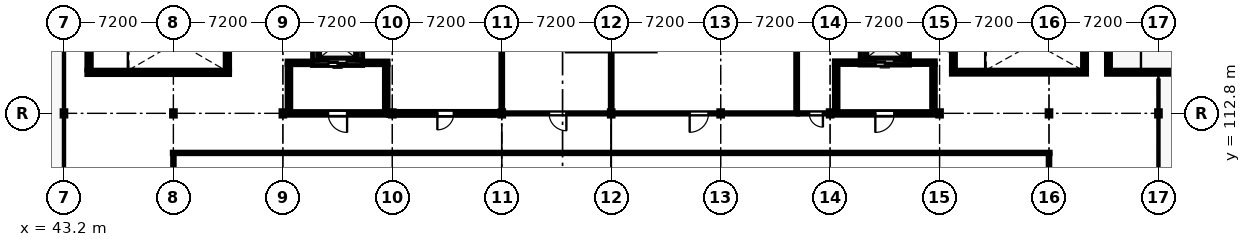
"""IFC4 building model, lengths in metres.
Left out: names, types, materials, properties, quantities, classifications, styles, units other than length and angle.
Written with IfcOpenShell. Run it as: python <this file> out.ifc"""

import sys

from ifc_helpers import new_model, si_unit, direction, frame, frame_2d, origin, origin_2d, place, context, subcontext, project, spatial, rectangle, i_section, extrude, element, fill, save


model = new_model("IFC4")
c1 = context("Model", 3, precision=1e-05, world=origin(), true_north=direction((0.0, 1.0)))
c2 = subcontext(c1, "Body", "Model", "MODEL_VIEW")
j1 = project(units=[si_unit("LENGTHUNIT", "METRE"), si_unit("PLANEANGLEUNIT", "RADIAN")], contexts=[c1])
p1 = place(None, origin())
s1 = spatial("IfcSite", under=j1, at=p1, CompositionType="ELEMENT")
p2 = place(p1, origin())
s2 = spatial("IfcBuilding", under=s1, at=p2, CompositionType="ELEMENT")
p3 = place(p2, frame((0.0, 0.0, 21.0)))
s3 = spatial("IfcBuildingStorey", under=s2, at=p3, CompositionType="ELEMENT", Elevation=21.0)
for number, where, z_axis, x_axis in (
    (1, (43.2, 112.8, 0.0), (0.0, 0.0, 1.0), (1.0, 0.0, 0.0)),
    (2, (50.4, 112.8, 0.0), (0.0, 0.0, 1.0), (1.0, 0.0, 0.0)),
    (3, (57.6, 112.8, 0.0), (0.0, 0.0, 1.0), (1.0, 0.0, 0.0)),
    (4, (64.8, 112.8, 0.0), (0.0, 0.0, 1.0), (1.0, 0.0, 0.0)),
    (5, (72.0, 112.8, 0.0), (0.0, 0.0, 1.0), (1.0, 0.0, 0.0)),
    (6, (79.2, 112.8, 0.0), (0.0, 0.0, 1.0), (1.0, 0.0, 0.0)),
    (7, (86.4, 112.8, 0.0), (0.0, 0.0, 1.0), (1.0, 0.0, 0.0)),
    (8, (93.6, 112.8, 0.0), (0.0, 0.0, 1.0), (1.0, 0.0, 0.0)),
    (9, (100.8, 112.8, 0.0), (0.0, 0.0, 1.0), (1.0, 0.0, 0.0)),
    (10, (108.0, 112.8, 0.0), (0.0, 0.0, 1.0), (1.0, 0.0, 0.0)),
    (11, (115.2, 112.8, 0.0), (0.0, 0.0, 1.0), (1.0, 0.0, 0.0)),
):
    element("IfcColumn", number, at=place(p3, frame(where, z_axis=z_axis, x_axis=x_axis)), inside=s3, PredefinedType="COLUMN", context=c2, shape_type="SweptSolid", body=[
        extrude(i_section(OverallWidth=0.257, OverallDepth=0.363, WebThickness=0.013, FlangeThickness=0.022, FilletRadius=0.015, at=origin_2d()), origin(), (0.0, 0.0, 1.0), 3.3),
    ])
p4 = place(p3, frame((54.1, 115.5, 0.0), z_axis=(0.0, 0.0, 1.0), x_axis=(-1.0, 0.0, 0.0)))
e12 = element("IfcWall", 12, at=p4, inside=s3, PredefinedType="SOLIDWALL", context=c2, shape_type="SweptSolid", body=[
    extrude(rectangle(XDim=9.4, YDim=0.3, at=frame_2d((4.7, 0.0))), origin(), (0.0, 0.0, 1.0), 2.6),
])
p5 = place(p3, frame((44.85, 115.65, 0.0), z_axis=(0.0, 0.0, 1.0), x_axis=(0.0, 1.0, 0.0)))
e13 = element("IfcWall", 13, at=p5, inside=s3, PredefinedType="SOLIDWALL", context=c2, shape_type="SweptSolid", body=[
    extrude(rectangle(XDim=3.68, YDim=0.3, at=frame_2d((1.84, 0.0))), origin(), (0.0, 0.0, 1.0), 2.6),
])
p6 = place(p5, frame((1.215, 0.0, 0.0)))
e14 = element("IfcOpeningElement", 14, at=p6, cuts=e13, PredefinedType="OPENING", context=c2, shape_type="SweptSolid", body=[
    extrude(rectangle(XDim=1.25, YDim=2.2, at=frame_2d((0.625, 1.1))), frame((0.0, 0.16, 0.0), z_axis=(0.0, -1.0, 0.0), x_axis=(1.0, 0.0, 0.0)), (0.0, 0.0, 1.0), 0.32),
])
p7 = place(p3, frame((53.95, 119.33, 0.0), z_axis=(0.0, 0.0, 1.0), x_axis=(0.0, -1.0, 0.0)))
e15 = element("IfcWall", 15, at=p7, inside=s3, PredefinedType="SOLIDWALL", context=c2, shape_type="SweptSolid", body=[
    extrude(rectangle(XDim=3.68, YDim=0.3, at=frame_2d((1.84, 0.0))), origin(), (0.0, 0.0, 1.0), 2.6),
])
p8 = place(p3, frame((110.475, 115.512, 0.0), z_axis=(0.0, 0.0, 1.0), x_axis=(-1.0, 0.0, 0.0)))
e16 = element("IfcWall", 16, at=p8, inside=s3, PredefinedType="SOLIDWALL", context=c2, shape_type="SweptSolid", body=[
    extrude(rectangle(XDim=8.9, YDim=0.275, at=frame_2d((4.45, 0.0))), origin(), (0.0, 0.0, 1.0), 2.6),
])
p9 = place(p3, frame((101.712, 115.65, 0.0), z_axis=(0.0, 0.0, 1.0), x_axis=(0.0, 1.0, 0.0)))
e17 = element("IfcWall", 17, at=p9, inside=s3, PredefinedType="SOLIDWALL", context=c2, shape_type="SweptSolid", body=[
    extrude(rectangle(XDim=3.56, YDim=0.275, at=frame_2d((1.78, 0.0))), origin(), (0.0, 0.0, 1.0), 2.6),
])
p10 = place(p9, frame((1.155, 0.0, 0.0)))
e18 = element("IfcOpeningElement", 18, at=p10, cuts=e17, PredefinedType="OPENING", context=c2, shape_type="SweptSolid", body=[
    extrude(rectangle(XDim=1.25, YDim=2.2, at=frame_2d((0.625, 1.1))), frame((0.0, 0.147, 0.0), z_axis=(0.0, -1.0, 0.0), x_axis=(1.0, 0.0, 0.0)), (0.0, 0.0, 1.0), 0.295),
])
p11 = place(p3, frame((110.338, 119.21, 0.0), z_axis=(0.0, 0.0, 1.0), x_axis=(0.0, -1.0, 0.0)))
e19 = element("IfcWall", 19, at=p11, inside=s3, PredefinedType="SOLIDWALL", context=c2, shape_type="SweptSolid", body=[
    extrude(rectangle(XDim=3.56, YDim=0.275, at=frame_2d((1.78, 0.0))), origin(), (0.0, 0.0, 1.0), 2.6),
])
p12 = place(p3, frame((120.725, 115.512, 0.0), z_axis=(0.0, 0.0, 1.0), x_axis=(-1.0, 0.0, 0.0)))
e20 = element("IfcWall", 20, at=p12, inside=s3, PredefinedType="SOLIDWALL", context=c2, shape_type="SweptSolid", body=[
    extrude(rectangle(XDim=8.95, YDim=0.275, at=frame_2d((4.475, 0.0))), origin(), (0.0, 0.0, 1.0), 2.25),
])
p13 = place(p3, frame((111.912, 115.65, 0.0), z_axis=(0.0, 0.0, 1.0), x_axis=(0.0, 1.0, 0.0)))
e21 = element("IfcWall", 21, at=p13, inside=s3, PredefinedType="SOLIDWALL", context=c2, shape_type="SweptSolid", body=[
    extrude(rectangle(XDim=3.56, YDim=0.275, at=frame_2d((1.78, 0.0))), origin(), (0.0, 0.0, 1.0), 2.25),
])
p14 = place(p13, frame((1.18, 0.0, 0.0)))
e22 = element("IfcOpeningElement", 22, at=p14, cuts=e21, PredefinedType="OPENING", context=c2, shape_type="SweptSolid", body=[
    extrude(rectangle(XDim=1.2, YDim=2.2, at=frame_2d((0.6, 1.1))), frame((0.0, 0.147, 0.0), z_axis=(0.0, -1.0, 0.0), x_axis=(1.0, 0.0, 0.0)), (0.0, 0.0, 1.0), 0.295),
])
p15 = place(p3, frame((62.85, 116.125, 0.0), z_axis=(0.0, 0.0, 1.0), x_axis=(-1.0, 0.0, 0.0)))
e23 = element("IfcWall", 23, at=p15, inside=s3, PredefinedType="SHEAR", context=c2, shape_type="SweptSolid", body=[
    extrude(rectangle(XDim=3.3, YDim=0.35, at=frame_2d((1.65, 0.0))), origin(), (0.0, 0.0, 1.0), 2.6),
])
p16 = place(p15, frame((1.05, 0.0, 0.0)))
e24 = element("IfcOpeningElement", 24, at=p16, cuts=e23, PredefinedType="OPENING", context=c2, shape_type="SweptSolid", body=[
    extrude(rectangle(XDim=1.2, YDim=2.2, at=frame_2d((0.6, 1.1))), frame((0.0, 0.185, 0.0), z_axis=(0.0, -1.0, 0.0), x_axis=(1.0, 0.0, 0.0)), (0.0, 0.0, 1.0), 0.37),
])
for number, where, z_axis, x_axis in (
    (25, (59.725, 116.3, 0.0), (0.0, 0.0, 1.0), (0.0, 1.0, 0.0)),
    (26, (62.675, 118.5, 0.0), (0.0, 0.0, 1.0), (0.0, -1.0, 0.0)),
):
    element("IfcWall", number, at=place(p3, frame(where, z_axis=z_axis, x_axis=x_axis)), inside=s3, PredefinedType="SHEAR", context=c2, shape_type="SweptSolid", body=[
        extrude(rectangle(XDim=2.2, YDim=0.35, at=frame_2d((1.1, 0.0))), origin(), (0.0, 0.0, 1.0), 2.6),
    ])
p17 = place(p3, frame((98.825, 116.138, 0.0), z_axis=(0.0, 0.0, 1.0), x_axis=(-1.0, 0.0, 0.0)))
e27 = element("IfcWall", 27, at=p17, inside=s3, PredefinedType="SHEAR", context=c2, shape_type="SweptSolid", body=[
    extrude(rectangle(XDim=3.25, YDim=0.325, at=frame_2d((1.625, 0.0))), origin(), (0.0, 0.0, 1.0), 2.6),
])
p18 = place(p17, frame((1.025, 0.0, 0.0)))
e28 = element("IfcOpeningElement", 28, at=p18, cuts=e27, PredefinedType="OPENING", context=c2, shape_type="SweptSolid", body=[
    extrude(rectangle(XDim=1.2, YDim=2.2, at=frame_2d((0.6, 1.1))), frame((0.0, 0.172, 0.0), z_axis=(0.0, -1.0, 0.0), x_axis=(1.0, 0.0, 0.0)), (0.0, 0.0, 1.0), 0.345),
])
for number, where, z_axis, x_axis in (
    (29, (95.738, 116.3, 0.0), (0.0, 0.0, 1.0), (0.0, 1.0, 0.0)),
    (30, (98.662, 118.5, 0.0), (0.0, 0.0, 1.0), (0.0, -1.0, 0.0)),
):
    element("IfcWall", number, at=place(p3, frame(where, z_axis=z_axis, x_axis=x_axis)), inside=s3, PredefinedType="SHEAR", context=c2, shape_type="SweptSolid", body=[
        extrude(rectangle(XDim=2.2, YDim=0.325, at=frame_2d((1.1, 0.0))), origin(), (0.0, 0.0, 1.0), 2.6),
    ])
p19 = place(p3, frame((64.525, 112.8, 0.0), z_axis=(0.0, 0.0, 1.0), x_axis=(-1.0, 0.0, 0.0)))
e31 = element("IfcWall", 31, at=p19, inside=s3, PredefinedType="PARTITIONING", context=c2, shape_type="SweptSolid", body=[
    extrude(rectangle(XDim=6.65, YDim=0.25, at=frame_2d((3.325, 0.0))), origin(), (0.0, 0.0, 1.0), 2.5),
])
p20 = place(p19, frame((2.7, 0.0, 0.0)))
e32 = element("IfcOpeningElement", 32, at=p20, cuts=e31, PredefinedType="OPENING", context=c2, shape_type="SweptSolid", body=[
    extrude(rectangle(XDim=1.25, YDim=2.2, at=frame_2d((0.625, 1.1))), frame((0.0, 0.135, 0.0), z_axis=(0.0, -1.0, 0.0), x_axis=(1.0, 0.0, 0.0)), (0.0, 0.0, 1.0), 0.27),
])
p21 = place(p3, frame((57.875, 116.125, 0.0), z_axis=(0.0, 0.0, 1.0), x_axis=(1.0, 0.0, 0.0)))
e33 = element("IfcWall", 33, at=p21, inside=s3, PredefinedType="PARTITIONING", context=c2, shape_type="SweptSolid", body=[
    extrude(rectangle(XDim=1.673, YDim=0.25, at=frame_2d((0.836, 0.0))), origin(), (0.0, 0.0, 1.0), 2.5),
])
p22 = place(p3, frame((62.852, 116.125, 0.0), z_axis=(0.0, 0.0, 1.0), x_axis=(1.0, 0.0, 0.0)))
e34 = element("IfcWall", 34, at=p22, inside=s3, PredefinedType="PARTITIONING", context=c2, shape_type="SweptSolid", body=[
    extrude(rectangle(XDim=1.673, YDim=0.25, at=frame_2d((0.836, 0.0))), origin(), (0.0, 0.0, 1.0), 2.5),
])
for number, where, z_axis, x_axis in (
    (35, (58.0, 112.927, 0.0), (0.0, 0.0, 1.0), (0.0, 1.0, 0.0)),
    (36, (64.4, 115.998, 0.0), (0.0, 0.0, 1.0), (0.0, -1.0, 0.0)),
):
    element("IfcWall", number, at=place(p3, frame(where, z_axis=z_axis, x_axis=x_axis)), inside=s3, PredefinedType="PARTITIONING", context=c2, shape_type="SweptSolid", body=[
        extrude(rectangle(XDim=3.071, YDim=0.25, at=frame_2d((1.536, 0.0))), origin(), (0.0, 0.0, 1.0), 2.5),
    ])
p23 = place(p3, frame((100.525, 112.8, 0.0), z_axis=(0.0, 0.0, 1.0), x_axis=(-1.0, 0.0, 0.0)))
e37 = element("IfcWall", 37, at=p23, inside=s3, PredefinedType="PARTITIONING", context=c2, shape_type="SweptSolid", body=[
    extrude(rectangle(XDim=6.65, YDim=0.25, at=frame_2d((3.325, 0.0))), origin(), (0.0, 0.0, 1.0), 2.5),
])
p24 = place(p23, frame((2.7, 0.0, 0.0)))
e38 = element("IfcOpeningElement", 38, at=p24, cuts=e37, PredefinedType="OPENING", context=c2, shape_type="SweptSolid", body=[
    extrude(rectangle(XDim=1.25, YDim=2.2, at=frame_2d((0.625, 1.1))), frame((0.0, 0.135, 0.0), z_axis=(0.0, -1.0, 0.0), x_axis=(1.0, 0.0, 0.0)), (0.0, 0.0, 1.0), 0.27),
])
for number, where, z_axis, x_axis in (
    (39, (93.875, 116.138, 0.0), (0.0, 0.0, 1.0), (1.0, 0.0, 0.0)),
    (40, (98.827, 116.138, 0.0), (0.0, 0.0, 1.0), (1.0, 0.0, 0.0)),
):
    element("IfcWall", number, at=place(p3, frame(where, z_axis=z_axis, x_axis=x_axis)), inside=s3, PredefinedType="PARTITIONING", context=c2, shape_type="SweptSolid", body=[
        extrude(rectangle(XDim=1.698, YDim=0.25, at=frame_2d((0.849, 0.0))), origin(), (0.0, 0.0, 1.0), 2.5),
    ])
for number, where, z_axis, x_axis in (
    (41, (94.0, 112.927, 0.0), (0.0, 0.0, 1.0), (0.0, 1.0, 0.0)),
    (42, (100.4, 116.011, 0.0), (0.0, 0.0, 1.0), (0.0, -1.0, 0.0)),
):
    element("IfcWall", number, at=place(p3, frame(where, z_axis=z_axis, x_axis=x_axis)), inside=s3, PredefinedType="PARTITIONING", context=c2, shape_type="SweptSolid", body=[
        extrude(rectangle(XDim=3.084, YDim=0.25, at=frame_2d((1.542, 0.0))), origin(), (0.0, 0.0, 1.0), 2.5),
    ])
p25 = place(p3, frame((72.08, 112.8, 0.0), z_axis=(0.0, 0.0, 1.0), x_axis=(-1.0, 0.0, 0.0)))
e43 = element("IfcWall", 43, at=p25, inside=s3, PredefinedType="PARTITIONING", context=c2, shape_type="SweptSolid", body=[
    extrude(rectangle(XDim=7.553, YDim=0.27, at=frame_2d((3.776, 0.0))), origin(), (0.0, 0.0, 1.0), 2.5),
])
p26 = place(p25, frame((3.236, 0.0, 0.0)))
e44 = element("IfcOpeningElement", 44, at=p26, cuts=e43, PredefinedType="OPENING", context=c2, shape_type="SweptSolid", body=[
    extrude(rectangle(XDim=1.08, YDim=2.16, at=frame_2d((0.54, 1.08))), frame((0.0, 0.145, 0.0), z_axis=(0.0, -1.0, 0.0), x_axis=(1.0, 0.0, 0.0)), (0.0, 0.0, 1.0), 0.29),
])
p27 = place(p3, frame((79.28, 112.8, 0.0), z_axis=(0.0, 0.0, 1.0), x_axis=(-1.0, 0.0, 0.0)))
e45 = element("IfcWall", 45, at=p27, inside=s3, PredefinedType="PARTITIONING", context=c2, shape_type="SweptSolid", body=[
    extrude(rectangle(XDim=7.198, YDim=0.095, at=frame_2d((3.599, 0.0))), origin(), (0.0, 0.0, 1.0), 2.5),
])
p28 = place(p27, frame((3.029, 0.0, 0.0)))
e46 = element("IfcOpeningElement", 46, at=p28, cuts=e45, PredefinedType="OPENING", context=c2, shape_type="SweptSolid", body=[
    extrude(rectangle(XDim=1.14, YDim=2.16, at=frame_2d((0.57, 1.08))), frame((0.0, 0.057, 0.0), z_axis=(0.0, -1.0, 0.0), x_axis=(1.0, 0.0, 0.0)), (0.0, 0.0, 1.0), 0.115),
])
p29 = place(p3, frame((91.48, 112.8, 0.0), z_axis=(0.0, 0.0, 1.0), x_axis=(-1.0, 0.0, 0.0)))
e47 = element("IfcWall", 47, at=p29, inside=s3, PredefinedType="PARTITIONING", context=c2, shape_type="SweptSolid", body=[
    extrude(rectangle(XDim=12.198, YDim=0.1, at=frame_2d((6.099, 0.0))), origin(), (0.0, 0.0, 1.0), 2.5),
])
p30 = place(p29, frame((5.879, 0.0, 0.0)))
e48 = element("IfcOpeningElement", 48, at=p30, cuts=e47, PredefinedType="OPENING", context=c2, shape_type="SweptSolid", body=[
    extrude(rectangle(XDim=1.24, YDim=2.16, at=frame_2d((0.62, 1.08))), frame((0.0, 0.06, 0.0), z_axis=(0.0, -1.0, 0.0), x_axis=(1.0, 0.0, 0.0)), (0.0, 0.0, 1.0), 0.12),
])
p31 = place(p29, frame((8.369, 0.0, 0.95)))
e49 = element("IfcOpeningElement", 49, at=p31, cuts=e47, PredefinedType="OPENING", context=c2, shape_type="SweptSolid", body=[
    extrude(rectangle(XDim=1.75, YDim=1.15, at=frame_2d((0.875, 0.575))), frame((0.0, 0.06, 0.0), z_axis=(0.0, -1.0, 0.0), x_axis=(1.0, 0.0, 0.0)), (0.0, 0.0, 1.0), 0.12),
])
p32 = place(p3, frame((93.873, 112.8, 0.0), z_axis=(0.0, 0.0, 1.0), x_axis=(-1.0, 0.0, 0.0)))
e50 = element("IfcWall", 50, at=p32, inside=s3, PredefinedType="PARTITIONING", context=c2, shape_type="SweptSolid", body=[
    extrude(rectangle(XDim=2.391, YDim=0.105, at=frame_2d((1.196, 0.0))), origin(), (0.0, 0.0, 1.0), 2.5),
])
p33 = place(p32, frame((0.746, 0.0, 0.0)))
e51 = element("IfcOpeningElement", 51, at=p33, cuts=e50, PredefinedType="OPENING", context=c2, shape_type="SweptSolid", body=[
    extrude(rectangle(XDim=0.9, YDim=2.1, at=frame_2d((0.45, 1.05))), frame((0.0, 0.062, 0.0), z_axis=(0.0, -1.0, 0.0), x_axis=(1.0, 0.0, 0.0)), (0.0, 0.0, 1.0), 0.125),
])
p34 = place(p3, frame((50.32, 110.2, 0.0), z_axis=(0.0, 0.0, 1.0), x_axis=(1.0, 0.0, 0.0)))
e52 = element("IfcWall", 52, at=p34, inside=s3, PredefinedType="PARTITIONING", context=c2, shape_type="SweptSolid", body=[
    extrude(rectangle(XDim=57.76, YDim=0.11, at=frame_2d((28.88, 0.0))), origin(), (0.0, 0.0, 1.0), 2.5),
])
p35 = place(p3, frame((50.4, 84.122, 0.0), z_axis=(0.0, 0.0, 1.0), x_axis=(0.0, 1.0, 0.0)))
e53 = element("IfcWall", 53, at=p35, inside=s3, PredefinedType="PARTITIONING", context=c2, shape_type="SweptSolid", body=[
    extrude(rectangle(XDim=26.021, YDim=0.115, at=frame_2d((13.01, 0.0))), origin(), (0.0, 0.0, 1.0), 2.5),
])
p36 = place(p35, frame((12.5, 0.0, 0.0)))
e54 = element("IfcOpeningElement", 54, at=p36, cuts=e53, PredefinedType="OPENING", context=c2, shape_type="SweptSolid", body=[
    extrude(rectangle(XDim=1.02, YDim=2.16, at=frame_2d((0.51, 1.08))), frame((0.0, 0.067, 0.0), z_axis=(0.0, -1.0, 0.0), x_axis=(1.0, 0.0, 0.0)), (0.0, 0.0, 1.0), 0.135),
])
p37 = place(p35, frame((14.77, 0.0, 0.95)))
e55 = element("IfcOpeningElement", 55, at=p37, cuts=e53, PredefinedType="OPENING", context=c2, shape_type="SweptSolid", body=[
    extrude(rectangle(XDim=1.5, YDim=1.15, at=frame_2d((0.75, 0.575))), frame((0.0, 0.067, 0.0), z_axis=(0.0, -1.0, 0.0), x_axis=(1.0, 0.0, 0.0)), (0.0, 0.0, 1.0), 0.135),
])
p38 = place(p3, frame((108.0, 110.143, 0.0), z_axis=(0.0, 0.0, 1.0), x_axis=(0.0, -1.0, 0.0)))
e56 = element("IfcWall", 56, at=p38, inside=s3, PredefinedType="PARTITIONING", context=c2, shape_type="SweptSolid", body=[
    extrude(rectangle(XDim=26.021, YDim=0.12, at=frame_2d((13.01, 0.0))), origin(), (0.0, 0.0, 1.0), 2.5),
])
p39 = place(p3, frame((72.0, 119.858, 0.0), z_axis=(0.0, 0.0, 1.0), x_axis=(0.0, -1.0, 0.0)))
e57 = element("IfcWall", 57, at=p39, inside=s3, PredefinedType="PARTITIONING", context=c2, shape_type="SweptSolid", body=[
    extrude(rectangle(XDim=6.921, YDim=0.125, at=frame_2d((3.46, 0.0))), origin(), (0.0, 0.0, 1.0), 2.5),
])
p40 = place(p3, frame((79.2, 119.858, 0.0), z_axis=(0.0, 0.0, 1.0), x_axis=(0.0, -1.0, 0.0)))
e58 = element("IfcWall", 58, at=p40, inside=s3, PredefinedType="PARTITIONING", context=c2, shape_type="SweptSolid", body=[
    extrude(rectangle(XDim=7.006, YDim=0.13, at=frame_2d((3.503, 0.0))), origin(), (0.0, 0.0, 1.0), 2.5),
])
p41 = place(p3, frame((91.4, 119.858, 0.0), z_axis=(0.0, 0.0, 1.0), x_axis=(0.0, -1.0, 0.0)))
e59 = element("IfcWall", 59, at=p41, inside=s3, PredefinedType="PARTITIONING", context=c2, shape_type="SweptSolid", body=[
    extrude(rectangle(XDim=7.004, YDim=0.135, at=frame_2d((3.502, 0.0))), origin(), (0.0, 0.0, 1.0), 2.5),
])
p42 = place(p10, origin())
e60 = element("IfcDoor", 60, at=p42, inside=s3, OperationType="SINGLE_SWING_RIGHT", PredefinedType="DOOR", context=c2, shape_type="SweptSolid", body=[
    extrude(rectangle(XDim=1.25, YDim=2.2, at=frame_2d((0.625, 1.1))), frame((0.0, 0.025, 0.0), z_axis=(0.0, -1.0, 0.0), x_axis=(1.0, 0.0, 0.0)), (0.0, 0.0, 1.0), 0.05),
])
fill(e18, e60)
p43 = place(p16, origin())
e61 = element("IfcDoor", 61, at=p43, inside=s3, OperationType="DOUBLE_DOOR_SLIDING", PredefinedType="DOOR", context=c2, shape_type="SweptSolid", body=[
    extrude(rectangle(XDim=1.2, YDim=2.2, at=frame_2d((0.6, 1.1))), frame((0.0, 0.025, 0.0), z_axis=(0.0, -1.0, 0.0), x_axis=(1.0, 0.0, 0.0)), (0.0, 0.0, 1.0), 0.05),
])
fill(e24, e61)
p44 = place(p18, origin())
e62 = element("IfcDoor", 62, at=p44, inside=s3, OperationType="DOUBLE_DOOR_SLIDING", PredefinedType="DOOR", context=c2, shape_type="SweptSolid", body=[
    extrude(rectangle(XDim=1.2, YDim=2.2, at=frame_2d((0.6, 1.1))), frame((0.0, 0.025, 0.0), z_axis=(0.0, -1.0, 0.0), x_axis=(1.0, 0.0, 0.0)), (0.0, 0.0, 1.0), 0.05),
])
fill(e28, e62)
p45 = place(p20, origin())
e63 = element("IfcDoor", 63, at=p45, inside=s3, OperationType="SINGLE_SWING_LEFT", PredefinedType="DOOR", context=c2, shape_type="SweptSolid", body=[
    extrude(rectangle(XDim=1.25, YDim=2.2, at=frame_2d((0.625, 1.1))), frame((0.0, 0.025, 0.0), z_axis=(0.0, -1.0, 0.0), x_axis=(1.0, 0.0, 0.0)), (0.0, 0.0, 1.0), 0.05),
])
fill(e32, e63)
p46 = place(p24, origin())
e64 = element("IfcDoor", 64, at=p46, inside=s3, OperationType="SINGLE_SWING_RIGHT", PredefinedType="DOOR", context=c2, shape_type="SweptSolid", body=[
    extrude(rectangle(XDim=1.25, YDim=2.2, at=frame_2d((0.625, 1.1))), frame((0.0, 0.025, 0.0), z_axis=(0.0, -1.0, 0.0), x_axis=(1.0, 0.0, 0.0)), (0.0, 0.0, 1.0), 0.05),
])
fill(e38, e64)
p47 = place(p26, origin())
e65 = element("IfcDoor", 65, at=p47, inside=s3, OperationType="SINGLE_SWING_RIGHT", PredefinedType="DOOR", context=c2, shape_type="SweptSolid", body=[
    extrude(rectangle(XDim=1.08, YDim=2.16, at=frame_2d((0.54, 1.08))), frame((0.0, 0.025, 0.0), z_axis=(0.0, -1.0, 0.0), x_axis=(1.0, 0.0, 0.0)), (0.0, 0.0, 1.0), 0.05),
])
fill(e44, e65)
p48 = place(p28, origin())
e66 = element("IfcDoor", 66, at=p48, inside=s3, OperationType="SINGLE_SWING_LEFT", PredefinedType="DOOR", context=c2, shape_type="SweptSolid", body=[
    extrude(rectangle(XDim=1.14, YDim=2.16, at=frame_2d((0.57, 1.08))), frame((0.0, 0.025, 0.0), z_axis=(0.0, -1.0, 0.0), x_axis=(1.0, 0.0, 0.0)), (0.0, 0.0, 1.0), 0.05),
])
fill(e46, e66)
p49 = place(p30, origin())
e67 = element("IfcDoor", 67, at=p49, inside=s3, OperationType="SINGLE_SWING_RIGHT", PredefinedType="DOOR", context=c2, shape_type="SweptSolid", body=[
    extrude(rectangle(XDim=1.24, YDim=2.16, at=frame_2d((0.62, 1.08))), frame((0.0, 0.025, 0.0), z_axis=(0.0, -1.0, 0.0), x_axis=(1.0, 0.0, 0.0)), (0.0, 0.0, 1.0), 0.05),
])
fill(e48, e67)
p50 = place(p31, origin())
e68 = element("IfcWindow", 68, at=p50, inside=s3, PartitioningType="SINGLE_PANEL", PredefinedType="WINDOW", context=c2, shape_type="SweptSolid", body=[
    extrude(rectangle(XDim=1.75, YDim=1.15, at=frame_2d((0.875, 0.575))), frame((0.0, 0.03, 0.0), z_axis=(0.0, -1.0, 0.0), x_axis=(1.0, 0.0, 0.0)), (0.0, 0.0, 1.0), 0.06),
])
fill(e49, e68)
p51 = place(p33, origin())
e69 = element("IfcDoor", 69, at=p51, inside=s3, OperationType="SINGLE_SWING_LEFT", PredefinedType="DOOR", context=c2, shape_type="SweptSolid", body=[
    extrude(rectangle(XDim=0.9, YDim=2.1, at=frame_2d((0.45, 1.05))), frame((0.0, 0.025, 0.0), z_axis=(0.0, -1.0, 0.0), x_axis=(1.0, 0.0, 0.0)), (0.0, 0.0, 1.0), 0.05),
])
fill(e51, e69)
save(model, sys.argv[1])
